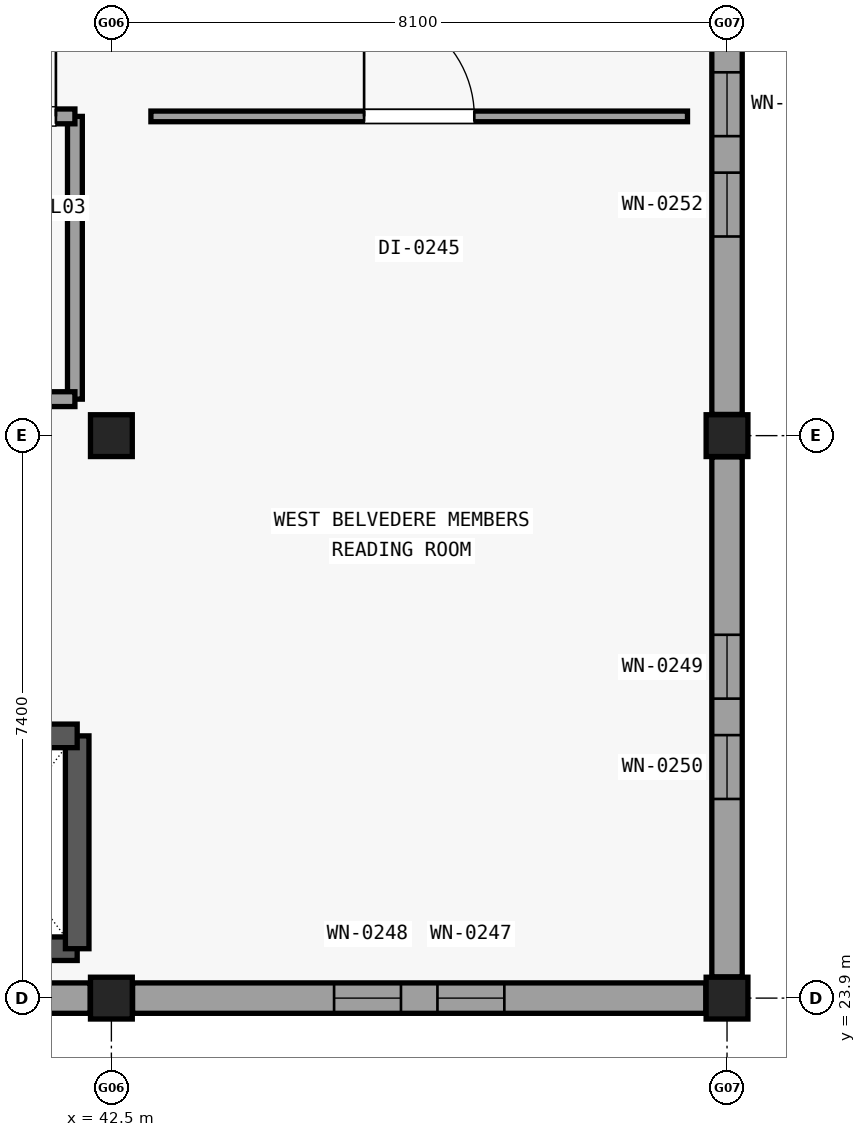
"""IFC4 building model, lengths in metres.
Left out: names, types, materials, properties, quantities, classifications, styles, units other than length and angle.
Written with IfcOpenShell. Run it as: python <this file> out.ifc"""

import sys

from ifc_helpers import new_model, si_unit, direction, frame, frame_2d, origin, origin_2d, place, context, subcontext, project, spatial, rectangle, extrude, element, fill, save


model = new_model("IFC4")
c1 = context("Model", 3, precision=1e-05, world=origin(), true_north=direction((0.0, 1.0)))
c2 = subcontext(c1, "Body", "Model", "MODEL_VIEW")
j1 = project(units=[si_unit("LENGTHUNIT", "METRE"), si_unit("PLANEANGLEUNIT", "RADIAN")], contexts=[c1])
p1 = place(None, origin())
s1 = spatial("IfcSite", under=j1, at=p1, CompositionType="ELEMENT")
p2 = place(p1, origin())
s2 = spatial("IfcBuilding", under=s1, at=p2, CompositionType="ELEMENT")
p3 = place(p2, frame((0.0, 0.0, 13.8)))
s3 = spatial("IfcBuildingStorey", under=s2, at=p3, CompositionType="ELEMENT", Elevation=13.8)
for number, where, z_axis, x_axis in (
    (1, (42.5, 23.9, 0.0), (0.0, 0.0, 1.0), (1.0, 0.0, 0.0)),
    (2, (42.5, 31.3, 0.0), (0.0, 0.0, 1.0), (1.0, 0.0, 0.0)),
    (3, (50.6, 23.9, 0.0), (0.0, 0.0, 1.0), (1.0, 0.0, 0.0)),
    (4, (50.6, 31.3, 0.0), (0.0, 0.0, 1.0), (1.0, 0.0, 0.0)),
):
    element("IfcColumn", number, at=place(p3, frame(where, z_axis=z_axis, x_axis=x_axis)), inside=s3, PredefinedType="COLUMN", context=c2, shape_type="SweptSolid", body=[
        extrude(rectangle(XDim=0.55, YDim=0.55, at=origin_2d()), origin(), (0.0, 0.0, 1.0), 3.38),
    ])
p4 = place(p3, frame((42.221, 23.9, 0.0), z_axis=(0.0, 0.0, 1.0), x_axis=(-1.0, 0.0, 0.0)))
e5 = element("IfcWall", 5, at=p4, inside=s3, PredefinedType="SOLIDWALL", context=c2, shape_type="SweptSolid", body=[
    extrude(rectangle(XDim=7.542, YDim=0.4, at=frame_2d((3.771, 0.0))), origin(), (0.0, 0.0, 1.0), 2.908),
])
p5 = place(p4, frame((2.651, 0.0, 0.6)))
e6 = element("IfcOpeningElement", 6, at=p5, cuts=e5, PredefinedType="OPENING", context=c2, shape_type="SweptSolid", body=[
    extrude(rectangle(XDim=0.88, YDim=1.9, at=frame_2d((0.44, 0.95))), frame((0.0, 0.21, 0.0), z_axis=(0.0, -1.0, 0.0), x_axis=(1.0, 0.0, 0.0)), (0.0, 0.0, 1.0), 0.42),
])
p6 = place(p4, frame((4.011, 0.0, 0.6)))
e7 = element("IfcOpeningElement", 7, at=p6, cuts=e5, PredefinedType="OPENING", context=c2, shape_type="SweptSolid", body=[
    extrude(rectangle(XDim=0.88, YDim=1.9, at=frame_2d((0.44, 0.95))), frame((0.0, 0.21, 0.0), z_axis=(0.0, -1.0, 0.0), x_axis=(1.0, 0.0, 0.0)), (0.0, 0.0, 1.0), 0.42),
])
p7 = place(p3, frame((50.321, 23.9, 0.0), z_axis=(0.0, 0.0, 1.0), x_axis=(-1.0, 0.0, 0.0)))
e8 = element("IfcWall", 8, at=p7, inside=s3, PredefinedType="SOLIDWALL", context=c2, shape_type="SweptSolid", body=[
    extrude(rectangle(XDim=7.542, YDim=0.4, at=frame_2d((3.771, 0.0))), origin(), (0.0, 0.0, 1.0), 2.908),
])
p8 = place(p7, frame((2.651, 0.0, 0.6)))
e9 = element("IfcOpeningElement", 9, at=p8, cuts=e8, PredefinedType="OPENING", context=c2, shape_type="SweptSolid", body=[
    extrude(rectangle(XDim=0.88, YDim=1.9, at=frame_2d((0.44, 0.95))), frame((0.0, 0.21, 0.0), z_axis=(0.0, -1.0, 0.0), x_axis=(1.0, 0.0, 0.0)), (0.0, 0.0, 1.0), 0.42),
])
p9 = place(p7, frame((4.011, 0.0, 0.6)))
e10 = element("IfcOpeningElement", 10, at=p9, cuts=e8, PredefinedType="OPENING", context=c2, shape_type="SweptSolid", body=[
    extrude(rectangle(XDim=0.88, YDim=1.9, at=frame_2d((0.44, 0.95))), frame((0.0, 0.21, 0.0), z_axis=(0.0, -1.0, 0.0), x_axis=(1.0, 0.0, 0.0)), (0.0, 0.0, 1.0), 0.42),
])
p10 = place(p3, frame((50.6, 31.021, 0.0), z_axis=(0.0, 0.0, 1.0), x_axis=(0.0, -1.0, 0.0)))
e11 = element("IfcWall", 11, at=p10, inside=s3, PredefinedType="SOLIDWALL", context=c2, shape_type="SweptSolid", body=[
    extrude(rectangle(XDim=6.842, YDim=0.4, at=frame_2d((3.421, 0.0))), origin(), (0.0, 0.0, 1.0), 2.908),
])
p11 = place(p10, frame((2.341, 0.0, 0.6)))
e12 = element("IfcOpeningElement", 12, at=p11, cuts=e11, PredefinedType="OPENING", context=c2, shape_type="SweptSolid", body=[
    extrude(rectangle(XDim=0.84, YDim=1.96, at=frame_2d((0.42, 0.98))), frame((0.0, 0.21, 0.0), z_axis=(0.0, -1.0, 0.0), x_axis=(1.0, 0.0, 0.0)), (0.0, 0.0, 1.0), 0.42),
])
p12 = place(p10, frame((3.661, 0.0, 0.6)))
e13 = element("IfcOpeningElement", 13, at=p12, cuts=e11, PredefinedType="OPENING", context=c2, shape_type="SweptSolid", body=[
    extrude(rectangle(XDim=0.84, YDim=1.96, at=frame_2d((0.42, 0.98))), frame((0.0, 0.21, 0.0), z_axis=(0.0, -1.0, 0.0), x_axis=(1.0, 0.0, 0.0)), (0.0, 0.0, 1.0), 0.42),
])
p13 = place(p3, frame((50.6, 38.421, 0.0), z_axis=(0.0, 0.0, 1.0), x_axis=(0.0, -1.0, 0.0)))
e14 = element("IfcWall", 14, at=p13, inside=s3, PredefinedType="SOLIDWALL", context=c2, shape_type="SweptSolid", body=[
    extrude(rectangle(XDim=6.842, YDim=0.4, at=frame_2d((3.421, 0.0))), origin(), (0.0, 0.0, 1.0), 2.908),
])
p14 = place(p13, frame((2.341, 0.0, 0.6)))
e15 = element("IfcOpeningElement", 15, at=p14, cuts=e14, PredefinedType="OPENING", context=c2, shape_type="SweptSolid", body=[
    extrude(rectangle(XDim=0.84, YDim=1.96, at=frame_2d((0.42, 0.98))), frame((0.0, 0.21, 0.0), z_axis=(0.0, -1.0, 0.0), x_axis=(1.0, 0.0, 0.0)), (0.0, 0.0, 1.0), 0.42),
])
p15 = place(p13, frame((3.661, 0.0, 0.6)))
e16 = element("IfcOpeningElement", 16, at=p15, cuts=e14, PredefinedType="OPENING", context=c2, shape_type="SweptSolid", body=[
    extrude(rectangle(XDim=0.84, YDim=1.96, at=frame_2d((0.42, 0.98))), frame((0.0, 0.21, 0.0), z_axis=(0.0, -1.0, 0.0), x_axis=(1.0, 0.0, 0.0)), (0.0, 0.0, 1.0), 0.42),
])
p16 = place(p3, frame((39.85, 24.55, 0.0), z_axis=(0.0, 0.0, 1.0), x_axis=(1.0, 0.0, 0.0)))
e17 = element("IfcWall", 17, at=p16, inside=s3, PredefinedType="SHEAR", context=c2, shape_type="SweptSolid", body=[
    extrude(rectangle(XDim=2.2, YDim=0.31, at=frame_2d((1.1, 0.0))), origin(), (0.0, 0.0, 1.0), 3.375),
])
p17 = place(p3, frame((42.05, 24.55, 0.0), z_axis=(0.0, 0.0, 1.0), x_axis=(0.0, 1.0, 0.0)))
e18 = element("IfcWall", 18, at=p17, inside=s3, PredefinedType="SHEAR", context=c2, shape_type="SweptSolid", body=[
    extrude(rectangle(XDim=2.8, YDim=0.31, at=frame_2d((1.4, 0.0))), origin(), (0.0, 0.0, 1.0), 3.375),
])
p18 = place(p3, frame((39.85, 27.35, 0.0), z_axis=(0.0, 0.0, 1.0), x_axis=(1.0, 0.0, 0.0)))
e19 = element("IfcWall", 19, at=p18, inside=s3, PredefinedType="SHEAR", context=c2, shape_type="SweptSolid", body=[
    extrude(rectangle(XDim=2.2, YDim=0.31, at=frame_2d((1.1, 0.0))), origin(), (0.0, 0.0, 1.0), 3.375),
])
p19 = place(p18, frame((0.5, 0.0, 0.0)))
e20 = element("IfcOpeningElement", 20, at=p19, cuts=e19, PredefinedType="OPENING", context=c2, shape_type="SweptSolid", body=[
    extrude(rectangle(XDim=1.2, YDim=2.15, at=frame_2d((0.6, 1.075))), frame((0.0, 0.165, 0.0), z_axis=(0.0, -1.0, 0.0), x_axis=(1.0, 0.0, 0.0)), (0.0, 0.0, 1.0), 0.33),
])
p20 = place(p3, frame((42.02, 31.78, 0.0), z_axis=(0.0, 0.0, 1.0), x_axis=(0.0, 1.0, 0.0)))
e21 = element("IfcWall", 21, at=p20, inside=s3, PredefinedType="PARTITIONING", context=c2, shape_type="SweptSolid", body=[
    extrude(rectangle(XDim=3.72, YDim=0.195, at=frame_2d((1.86, 0.0))), origin(), (0.0, 0.0, 1.0), 2.913),
])
p21 = place(p3, frame((39.05, 31.78, 0.0), z_axis=(0.0, 0.0, 1.0), x_axis=(1.0, 0.0, 0.0)))
e22 = element("IfcWall", 22, at=p21, inside=s3, PredefinedType="PARTITIONING", context=c2, shape_type="SweptSolid", body=[
    extrude(rectangle(XDim=2.97, YDim=0.195, at=frame_2d((1.485, 0.0))), origin(), (0.0, 0.0, 1.0), 2.913),
])
p22 = place(p3, frame((39.05, 35.5, 0.0), z_axis=(0.0, 0.0, 1.0), x_axis=(1.0, 0.0, 0.0)))
e23 = element("IfcWall", 23, at=p22, inside=s3, PredefinedType="PARTITIONING", context=c2, shape_type="SweptSolid", body=[
    extrude(rectangle(XDim=2.97, YDim=0.195, at=frame_2d((1.485, 0.0))), origin(), (0.0, 0.0, 1.0), 2.913),
])
p23 = place(p22, frame((0.25, 0.0, 0.0)))
e24 = element("IfcOpeningElement", 24, at=p23, cuts=e23, PredefinedType="OPENING", context=c2, shape_type="SweptSolid", body=[
    extrude(rectangle(XDim=0.95, YDim=2.1, at=frame_2d((0.475, 1.05))), frame((0.0, 0.107, 0.0), z_axis=(0.0, -1.0, 0.0), x_axis=(1.0, 0.0, 0.0)), (0.0, 0.0, 1.0), 0.215),
])
p24 = place(p22, frame((1.82, 0.0, 0.0)))
e25 = element("IfcOpeningElement", 25, at=p24, cuts=e23, PredefinedType="OPENING", context=c2, shape_type="SweptSolid", body=[
    extrude(rectangle(XDim=0.9, YDim=2.1, at=frame_2d((0.45, 1.05))), frame((0.0, 0.107, 0.0), z_axis=(0.0, -1.0, 0.0), x_axis=(1.0, 0.0, 0.0)), (0.0, 0.0, 1.0), 0.215),
])
p25 = place(p3, frame((43.02, 35.5, 0.0), z_axis=(0.0, 0.0, 1.0), x_axis=(1.0, 0.0, 0.0)))
e26 = element("IfcWall", 26, at=p25, inside=s3, PredefinedType="PARTITIONING", context=c2, shape_type="SweptSolid", body=[
    extrude(rectangle(XDim=7.06, YDim=0.14, at=frame_2d((3.53, 0.0))), origin(), (0.0, 0.0, 1.0), 2.913),
])
p26 = place(p25, frame((2.805, 0.0, 0.0)))
e27 = element("IfcOpeningElement", 27, at=p26, cuts=e26, PredefinedType="OPENING", context=c2, shape_type="SweptSolid", body=[
    extrude(rectangle(XDim=1.45, YDim=2.2, at=frame_2d((0.725, 1.1))), frame((0.0, 0.08, 0.0), z_axis=(0.0, -1.0, 0.0), x_axis=(1.0, 0.0, 0.0)), (0.0, 0.0, 1.0), 0.16),
])
p27 = place(p8, origin())
e28 = element("IfcWindow", 28, at=p27, inside=s3, PartitioningType="SINGLE_PANEL", PredefinedType="WINDOW", context=c2, shape_type="SweptSolid", body=[
    extrude(rectangle(XDim=0.88, YDim=1.9, at=frame_2d((0.44, 0.95))), frame((0.0, 0.03, 0.0), z_axis=(0.0, -1.0, 0.0), x_axis=(1.0, 0.0, 0.0)), (0.0, 0.0, 1.0), 0.06),
])
fill(e9, e28)
p28 = place(p9, origin())
e29 = element("IfcWindow", 29, at=p28, inside=s3, PartitioningType="SINGLE_PANEL", PredefinedType="WINDOW", context=c2, shape_type="SweptSolid", body=[
    extrude(rectangle(XDim=0.88, YDim=1.9, at=frame_2d((0.44, 0.95))), frame((0.0, 0.03, 0.0), z_axis=(0.0, -1.0, 0.0), x_axis=(1.0, 0.0, 0.0)), (0.0, 0.0, 1.0), 0.06),
])
fill(e10, e29)
p29 = place(p11, origin())
e30 = element("IfcWindow", 30, at=p29, inside=s3, PartitioningType="SINGLE_PANEL", PredefinedType="WINDOW", context=c2, shape_type="SweptSolid", body=[
    extrude(rectangle(XDim=0.84, YDim=1.96, at=frame_2d((0.42, 0.98))), frame((0.0, 0.03, 0.0), z_axis=(0.0, -1.0, 0.0), x_axis=(1.0, 0.0, 0.0)), (0.0, 0.0, 1.0), 0.06),
])
fill(e12, e30)
p30 = place(p12, origin())
e31 = element("IfcWindow", 31, at=p30, inside=s3, PartitioningType="SINGLE_PANEL", PredefinedType="WINDOW", context=c2, shape_type="SweptSolid", body=[
    extrude(rectangle(XDim=0.84, YDim=1.96, at=frame_2d((0.42, 0.98))), frame((0.0, 0.03, 0.0), z_axis=(0.0, -1.0, 0.0), x_axis=(1.0, 0.0, 0.0)), (0.0, 0.0, 1.0), 0.06),
])
fill(e13, e31)
p31 = place(p14, origin())
e32 = element("IfcWindow", 32, at=p31, inside=s3, PartitioningType="SINGLE_PANEL", PredefinedType="WINDOW", context=c2, shape_type="SweptSolid", body=[
    extrude(rectangle(XDim=0.84, YDim=1.96, at=frame_2d((0.42, 0.98))), frame((0.0, 0.03, 0.0), z_axis=(0.0, -1.0, 0.0), x_axis=(1.0, 0.0, 0.0)), (0.0, 0.0, 1.0), 0.06),
])
fill(e15, e32)
p32 = place(p15, origin())
e33 = element("IfcWindow", 33, at=p32, inside=s3, PartitioningType="SINGLE_PANEL", PredefinedType="WINDOW", context=c2, shape_type="SweptSolid", body=[
    extrude(rectangle(XDim=0.84, YDim=1.96, at=frame_2d((0.42, 0.98))), frame((0.0, 0.03, 0.0), z_axis=(0.0, -1.0, 0.0), x_axis=(1.0, 0.0, 0.0)), (0.0, 0.0, 1.0), 0.06),
])
fill(e16, e33)
p33 = place(p24, origin())
e34 = element("IfcDoor", 34, at=p33, inside=s3, OperationType="SINGLE_SWING_RIGHT", PredefinedType="DOOR", context=c2, shape_type="SweptSolid", body=[
    extrude(rectangle(XDim=0.9, YDim=2.1, at=frame_2d((0.45, 1.05))), frame((0.0, 0.025, 0.0), z_axis=(0.0, -1.0, 0.0), x_axis=(1.0, 0.0, 0.0)), (0.0, 0.0, 1.0), 0.05),
])
fill(e25, e34)
p34 = place(p26, origin())
e35 = element("IfcDoor", 35, at=p34, inside=s3, OperationType="SINGLE_SWING_LEFT", PredefinedType="DOOR", context=c2, shape_type="SweptSolid", body=[
    extrude(rectangle(XDim=1.45, YDim=2.2, at=frame_2d((0.725, 1.1))), frame((0.0, 0.025, 0.0), z_axis=(0.0, -1.0, 0.0), x_axis=(1.0, 0.0, 0.0)), (0.0, 0.0, 1.0), 0.05),
])
fill(e27, e35)
save(model, sys.argv[1])
